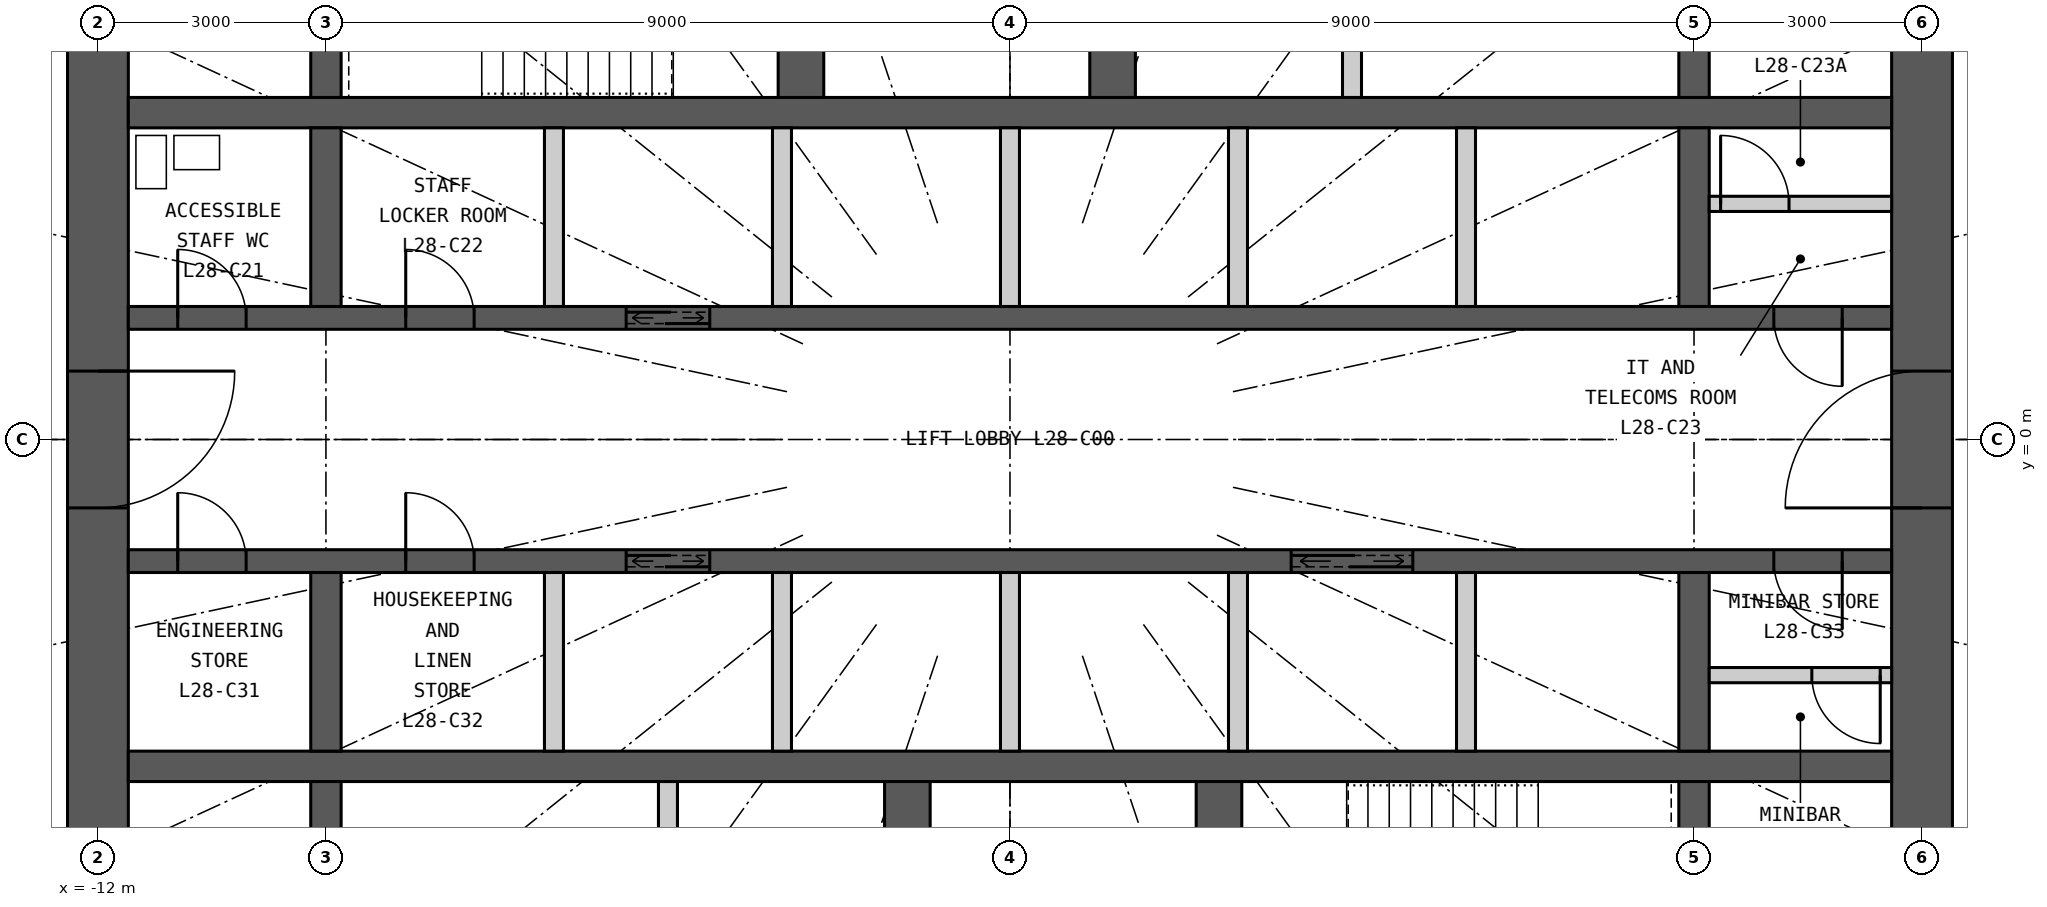
"""IFC4 building model, lengths in metres.
Left out: names, types, materials, properties, quantities, classifications, styles, units other than length and angle.
Written with IfcOpenShell. Run it as: python <this file> out.ifc"""

import sys

from ifc_helpers import new_model, si_unit, direction, frame, frame_2d, origin, place, context, subcontext, project, spatial, rectangle, extrude, element, fill, save


model = new_model("IFC4")
c1 = context("Model", 3, precision=1e-05, world=origin(), true_north=direction((0.0, 1.0)))
c2 = subcontext(c1, "Body", "Model", "MODEL_VIEW")
j1 = project(units=[si_unit("LENGTHUNIT", "METRE"), si_unit("PLANEANGLEUNIT", "RADIAN")], contexts=[c1])
p1 = place(None, origin())
s1 = spatial("IfcSite", under=j1, at=p1, CompositionType="ELEMENT")
p2 = place(p1, origin())
s2 = spatial("IfcBuilding", under=s1, at=p2, CompositionType="ELEMENT")
p3 = place(p2, frame((0.0, 0.0, 112.2)))
s3 = spatial("IfcBuildingStorey", under=s2, at=p3, CompositionType="ELEMENT", Elevation=112.2)
p4 = place(p3, frame((12.0, -7.6, 0.0), z_axis=(0.0, 0.0, 1.0), x_axis=(0.0, 1.0, 0.0)))
e1 = element("IfcWall", 1, at=p4, inside=s3, PredefinedType="SHEAR", context=c2, shape_type="SweptSolid", body=[
    extrude(rectangle(XDim=15.2, YDim=0.8, at=frame_2d((7.6, 0.0))), origin(), (0.0, 0.0, 1.0), 3.3),
])
p5 = place(p4, frame((6.7, 0.0, 0.0)))
e2 = element("IfcOpeningElement", 2, at=p5, cuts=e1, PredefinedType="OPENING", context=c2, shape_type="SweptSolid", body=[
    extrude(rectangle(XDim=1.8, YDim=2.2, at=frame_2d((0.9, 1.1))), frame((0.0, 0.41, 0.0), z_axis=(0.0, -1.0, 0.0), x_axis=(1.0, 0.0, 0.0)), (0.0, 0.0, 1.0), 0.82),
])
p6 = place(p3, frame((-12.0, 7.6, 0.0), z_axis=(0.0, 0.0, 1.0), x_axis=(0.0, -1.0, 0.0)))
e3 = element("IfcWall", 3, at=p6, inside=s3, PredefinedType="SHEAR", context=c2, shape_type="SweptSolid", body=[
    extrude(rectangle(XDim=15.2, YDim=0.8, at=frame_2d((7.6, 0.0))), origin(), (0.0, 0.0, 1.0), 3.3),
])
p7 = place(p6, frame((6.7, 0.0, 0.0)))
e4 = element("IfcOpeningElement", 4, at=p7, cuts=e3, PredefinedType="OPENING", context=c2, shape_type="SweptSolid", body=[
    extrude(rectangle(XDim=1.8, YDim=2.2, at=frame_2d((0.9, 1.1))), frame((0.0, 0.41, 0.0), z_axis=(0.0, -1.0, 0.0), x_axis=(1.0, 0.0, 0.0)), (0.0, 0.0, 1.0), 0.82),
])
p8 = place(p3, frame((-11.6, 4.3, 0.0), z_axis=(0.0, 0.0, 1.0), x_axis=(1.0, 0.0, 0.0)))
e5 = element("IfcWall", 5, at=p8, inside=s3, PredefinedType="SHEAR", context=c2, shape_type="SweptSolid", body=[
    extrude(rectangle(XDim=23.2, YDim=0.4, at=frame_2d((11.6, 0.0))), origin(), (0.0, 0.0, 1.0), 3.3),
])
p9 = place(p3, frame((-11.6, 1.6, 0.0), z_axis=(0.0, 0.0, 1.0), x_axis=(1.0, 0.0, 0.0)))
e6 = element("IfcWall", 6, at=p9, inside=s3, PredefinedType="SHEAR", context=c2, shape_type="SweptSolid", body=[
    extrude(rectangle(XDim=23.2, YDim=0.3, at=frame_2d((11.6, 0.0))), origin(), (0.0, 0.0, 1.0), 3.3),
])
p10 = place(p9, frame((6.55, 0.0, 0.0)))
e7 = element("IfcOpeningElement", 7, at=p10, cuts=e6, PredefinedType="OPENING", context=c2, shape_type="SweptSolid", body=[
    extrude(rectangle(XDim=1.1, YDim=2.2, at=frame_2d((0.55, 1.1))), frame((0.0, 0.16, 0.0), z_axis=(0.0, -1.0, 0.0), x_axis=(1.0, 0.0, 0.0)), (0.0, 0.0, 1.0), 0.32),
])
p11 = place(p9, frame((0.65, 0.0, 0.0)))
e8 = element("IfcOpeningElement", 8, at=p11, cuts=e6, PredefinedType="OPENING", context=c2, shape_type="SweptSolid", body=[
    extrude(rectangle(XDim=0.9, YDim=2.2, at=frame_2d((0.45, 1.1))), frame((0.0, 0.16, 0.0), z_axis=(0.0, -1.0, 0.0), x_axis=(1.0, 0.0, 0.0)), (0.0, 0.0, 1.0), 0.32),
])
p12 = place(p9, frame((3.65, 0.0, 0.0)))
e9 = element("IfcOpeningElement", 9, at=p12, cuts=e6, PredefinedType="OPENING", context=c2, shape_type="SweptSolid", body=[
    extrude(rectangle(XDim=0.9, YDim=2.2, at=frame_2d((0.45, 1.1))), frame((0.0, 0.16, 0.0), z_axis=(0.0, -1.0, 0.0), x_axis=(1.0, 0.0, 0.0)), (0.0, 0.0, 1.0), 0.32),
])
p13 = place(p9, frame((21.65, 0.0, 0.0)))
e10 = element("IfcOpeningElement", 10, at=p13, cuts=e6, PredefinedType="OPENING", context=c2, shape_type="SweptSolid", body=[
    extrude(rectangle(XDim=0.9, YDim=2.2, at=frame_2d((0.45, 1.1))), frame((0.0, 0.16, 0.0), z_axis=(0.0, -1.0, 0.0), x_axis=(1.0, 0.0, 0.0)), (0.0, 0.0, 1.0), 0.32),
])
p14 = place(p3, frame((-11.6, -4.3, 0.0), z_axis=(0.0, 0.0, 1.0), x_axis=(1.0, 0.0, 0.0)))
e11 = element("IfcWall", 11, at=p14, inside=s3, PredefinedType="SHEAR", context=c2, shape_type="SweptSolid", body=[
    extrude(rectangle(XDim=23.2, YDim=0.4, at=frame_2d((11.6, 0.0))), origin(), (0.0, 0.0, 1.0), 3.3),
])
p15 = place(p3, frame((-11.6, -1.6, 0.0), z_axis=(0.0, 0.0, 1.0), x_axis=(1.0, 0.0, 0.0)))
e12 = element("IfcWall", 12, at=p15, inside=s3, PredefinedType="SHEAR", context=c2, shape_type="SweptSolid", body=[
    extrude(rectangle(XDim=23.2, YDim=0.3, at=frame_2d((11.6, 0.0))), origin(), (0.0, 0.0, 1.0), 3.3),
])
p16 = place(p15, frame((6.55, 0.0, 0.0)))
e13 = element("IfcOpeningElement", 13, at=p16, cuts=e12, PredefinedType="OPENING", context=c2, shape_type="SweptSolid", body=[
    extrude(rectangle(XDim=1.1, YDim=2.2, at=frame_2d((0.55, 1.1))), frame((0.0, 0.16, 0.0), z_axis=(0.0, -1.0, 0.0), x_axis=(1.0, 0.0, 0.0)), (0.0, 0.0, 1.0), 0.32),
])
p17 = place(p15, frame((15.3, 0.0, 0.0)))
e14 = element("IfcOpeningElement", 14, at=p17, cuts=e12, PredefinedType="OPENING", context=c2, shape_type="SweptSolid", body=[
    extrude(rectangle(XDim=1.6, YDim=2.4, at=frame_2d((0.8, 1.2))), frame((0.0, 0.16, 0.0), z_axis=(0.0, -1.0, 0.0), x_axis=(1.0, 0.0, 0.0)), (0.0, 0.0, 1.0), 0.32),
])
p18 = place(p15, frame((0.65, 0.0, 0.0)))
e15 = element("IfcOpeningElement", 15, at=p18, cuts=e12, PredefinedType="OPENING", context=c2, shape_type="SweptSolid", body=[
    extrude(rectangle(XDim=0.9, YDim=2.2, at=frame_2d((0.45, 1.1))), frame((0.0, 0.16, 0.0), z_axis=(0.0, -1.0, 0.0), x_axis=(1.0, 0.0, 0.0)), (0.0, 0.0, 1.0), 0.32),
])
p19 = place(p15, frame((3.65, 0.0, 0.0)))
e16 = element("IfcOpeningElement", 16, at=p19, cuts=e12, PredefinedType="OPENING", context=c2, shape_type="SweptSolid", body=[
    extrude(rectangle(XDim=0.9, YDim=2.2, at=frame_2d((0.45, 1.1))), frame((0.0, 0.16, 0.0), z_axis=(0.0, -1.0, 0.0), x_axis=(1.0, 0.0, 0.0)), (0.0, 0.0, 1.0), 0.32),
])
p20 = place(p15, frame((21.65, 0.0, 0.0)))
e17 = element("IfcOpeningElement", 17, at=p20, cuts=e12, PredefinedType="OPENING", context=c2, shape_type="SweptSolid", body=[
    extrude(rectangle(XDim=0.9, YDim=2.2, at=frame_2d((0.45, 1.1))), frame((0.0, 0.16, 0.0), z_axis=(0.0, -1.0, 0.0), x_axis=(1.0, 0.0, 0.0)), (0.0, 0.0, 1.0), 0.32),
])
p21 = place(p3, frame((-9.0, 4.5, 0.0), z_axis=(0.0, 0.0, 1.0), x_axis=(0.0, 1.0, 0.0)))
e18 = element("IfcWall", 18, at=p21, inside=s3, PredefinedType="SHEAR", context=c2, shape_type="SweptSolid", body=[
    extrude(rectangle(XDim=3.1, YDim=0.4, at=frame_2d((1.55, 0.0))), origin(), (0.0, 0.0, 1.0), 3.3),
])
for number, where, z_axis, x_axis in (
    (19, (-9.0, 1.75, 0.0), (0.0, 0.0, 1.0), (0.0, 1.0, 0.0)),
    (20, (-9.0, -4.1, 0.0), (0.0, 0.0, 1.0), (0.0, 1.0, 0.0)),
):
    element("IfcWall", number, at=place(p3, frame(where, z_axis=z_axis, x_axis=x_axis)), inside=s3, PredefinedType="SHEAR", context=c2, shape_type="SweptSolid", body=[
        extrude(rectangle(XDim=2.35, YDim=0.4, at=frame_2d((1.175, 0.0))), origin(), (0.0, 0.0, 1.0), 3.3),
    ])
for number, where, z_axis, x_axis in (
    (21, (-9.0, -7.6, 0.0), (0.0, 0.0, 1.0), (0.0, 1.0, 0.0)),
    (22, (9.0, 4.5, 0.0), (0.0, 0.0, 1.0), (0.0, 1.0, 0.0)),
):
    element("IfcWall", number, at=place(p3, frame(where, z_axis=z_axis, x_axis=x_axis)), inside=s3, PredefinedType="SHEAR", context=c2, shape_type="SweptSolid", body=[
        extrude(rectangle(XDim=3.1, YDim=0.4, at=frame_2d((1.55, 0.0))), origin(), (0.0, 0.0, 1.0), 3.3),
    ])
for number, where, z_axis, x_axis in (
    (23, (9.0, 1.75, 0.0), (0.0, 0.0, 1.0), (0.0, 1.0, 0.0)),
    (24, (9.0, -4.1, 0.0), (0.0, 0.0, 1.0), (0.0, 1.0, 0.0)),
):
    element("IfcWall", number, at=place(p3, frame(where, z_axis=z_axis, x_axis=x_axis)), inside=s3, PredefinedType="SHEAR", context=c2, shape_type="SweptSolid", body=[
        extrude(rectangle(XDim=2.35, YDim=0.4, at=frame_2d((1.175, 0.0))), origin(), (0.0, 0.0, 1.0), 3.3),
    ])
p22 = place(p3, frame((9.0, -7.6, 0.0), z_axis=(0.0, 0.0, 1.0), x_axis=(0.0, 1.0, 0.0)))
e25 = element("IfcWall", 25, at=p22, inside=s3, PredefinedType="SHEAR", context=c2, shape_type="SweptSolid", body=[
    extrude(rectangle(XDim=3.1, YDim=0.4, at=frame_2d((1.55, 0.0))), origin(), (0.0, 0.0, 1.0), 3.3),
])
p23 = place(p3, frame((-2.75, 4.5, 0.0), z_axis=(0.0, 0.0, 1.0), x_axis=(0.0, 1.0, 0.0)))
e26 = element("IfcWall", 26, at=p23, inside=s3, PredefinedType="SHEAR", context=c2, shape_type="SweptSolid", body=[
    extrude(rectangle(XDim=3.1, YDim=0.6, at=frame_2d((1.55, 0.0))), origin(), (0.0, 0.0, 1.0), 3.3),
])
p24 = place(p23, frame((0.925, 0.0, 0.0)))
e27 = element("IfcOpeningElement", 27, at=p24, cuts=e26, PredefinedType="OPENING", context=c2, shape_type="SweptSolid", body=[
    extrude(rectangle(XDim=1.1, YDim=2.2, at=frame_2d((0.55, 1.1))), frame((0.0, 0.31, 0.0), z_axis=(0.0, -1.0, 0.0), x_axis=(1.0, 0.0, 0.0)), (0.0, 0.0, 1.0), 0.62),
])
p25 = place(p3, frame((1.35, 4.5, 0.0), z_axis=(0.0, 0.0, 1.0), x_axis=(0.0, 1.0, 0.0)))
e28 = element("IfcWall", 28, at=p25, inside=s3, PredefinedType="SHEAR", context=c2, shape_type="SweptSolid", body=[
    extrude(rectangle(XDim=3.1, YDim=0.6, at=frame_2d((1.55, 0.0))), origin(), (0.0, 0.0, 1.0), 3.3),
])
p26 = place(p25, frame((1.0, 0.0, 0.0)))
e29 = element("IfcOpeningElement", 29, at=p26, cuts=e28, PredefinedType="OPENING", context=c2, shape_type="SweptSolid", body=[
    extrude(rectangle(XDim=1.1, YDim=2.2, at=frame_2d((0.55, 1.1))), frame((0.0, 0.31, 0.0), z_axis=(0.0, -1.0, 0.0), x_axis=(1.0, 0.0, 0.0)), (0.0, 0.0, 1.0), 0.62),
])
p27 = place(p3, frame((4.5, 4.5, 0.0), z_axis=(0.0, 0.0, 1.0), x_axis=(0.0, 1.0, 0.0)))
e30 = element("IfcWall", 30, at=p27, inside=s3, PredefinedType="PARTITIONING", context=c2, shape_type="SweptSolid", body=[
    extrude(rectangle(XDim=3.1, YDim=0.25, at=frame_2d((1.55, 0.0))), origin(), (0.0, 0.0, 1.0), 3.3),
])
p28 = place(p3, frame((2.75, -7.6, 0.0), z_axis=(0.0, 0.0, 1.0), x_axis=(0.0, 1.0, 0.0)))
e31 = element("IfcWall", 31, at=p28, inside=s3, PredefinedType="SHEAR", context=c2, shape_type="SweptSolid", body=[
    extrude(rectangle(XDim=3.1, YDim=0.6, at=frame_2d((1.55, 0.0))), origin(), (0.0, 0.0, 1.0), 3.3),
])
p29 = place(p28, frame((1.075, 0.0, 0.0)))
e32 = element("IfcOpeningElement", 32, at=p29, cuts=e31, PredefinedType="OPENING", context=c2, shape_type="SweptSolid", body=[
    extrude(rectangle(XDim=1.1, YDim=2.2, at=frame_2d((0.55, 1.1))), frame((0.0, 0.31, 0.0), z_axis=(0.0, -1.0, 0.0), x_axis=(1.0, 0.0, 0.0)), (0.0, 0.0, 1.0), 0.62),
])
p30 = place(p3, frame((-1.35, -7.6, 0.0), z_axis=(0.0, 0.0, 1.0), x_axis=(0.0, 1.0, 0.0)))
e33 = element("IfcWall", 33, at=p30, inside=s3, PredefinedType="SHEAR", context=c2, shape_type="SweptSolid", body=[
    extrude(rectangle(XDim=3.1, YDim=0.6, at=frame_2d((1.55, 0.0))), origin(), (0.0, 0.0, 1.0), 3.3),
])
p31 = place(p30, frame((1.0, 0.0, 0.0)))
e34 = element("IfcOpeningElement", 34, at=p31, cuts=e33, PredefinedType="OPENING", context=c2, shape_type="SweptSolid", body=[
    extrude(rectangle(XDim=1.1, YDim=2.2, at=frame_2d((0.55, 1.1))), frame((0.0, 0.31, 0.0), z_axis=(0.0, -1.0, 0.0), x_axis=(1.0, 0.0, 0.0)), (0.0, 0.0, 1.0), 0.62),
])
p32 = place(p3, frame((-4.5, -7.6, 0.0), z_axis=(0.0, 0.0, 1.0), x_axis=(0.0, 1.0, 0.0)))
e35 = element("IfcWall", 35, at=p32, inside=s3, PredefinedType="PARTITIONING", context=c2, shape_type="SweptSolid", body=[
    extrude(rectangle(XDim=3.1, YDim=0.25, at=frame_2d((1.55, 0.0))), origin(), (0.0, 0.0, 1.0), 3.3),
])
for number, where, z_axis, x_axis in (
    (36, (-6.0, 1.75, 0.0), (0.0, 0.0, 1.0), (0.0, 1.0, 0.0)),
    (37, (-3.0, 1.75, 0.0), (0.0, 0.0, 1.0), (0.0, 1.0, 0.0)),
    (38, (0.0, 1.75, 0.0), (0.0, 0.0, 1.0), (0.0, 1.0, 0.0)),
    (39, (3.0, 1.75, 0.0), (0.0, 0.0, 1.0), (0.0, 1.0, 0.0)),
    (40, (6.0, 1.75, 0.0), (0.0, 0.0, 1.0), (0.0, 1.0, 0.0)),
    (41, (-6.0, -4.1, 0.0), (0.0, 0.0, 1.0), (0.0, 1.0, 0.0)),
    (42, (-3.0, -4.1, 0.0), (0.0, 0.0, 1.0), (0.0, 1.0, 0.0)),
    (43, (0.0, -4.1, 0.0), (0.0, 0.0, 1.0), (0.0, 1.0, 0.0)),
    (44, (3.0, -4.1, 0.0), (0.0, 0.0, 1.0), (0.0, 1.0, 0.0)),
    (45, (6.0, -4.1, 0.0), (0.0, 0.0, 1.0), (0.0, 1.0, 0.0)),
):
    element("IfcWall", number, at=place(p3, frame(where, z_axis=z_axis, x_axis=x_axis)), inside=s3, PredefinedType="PARTITIONING", context=c2, shape_type="SweptSolid", body=[
        extrude(rectangle(XDim=2.35, YDim=0.25, at=frame_2d((1.175, 0.0))), origin(), (0.0, 0.0, 1.0), 3.3),
    ])
p33 = place(p3, frame((9.2, 3.1, 0.0), z_axis=(0.0, 0.0, 1.0), x_axis=(1.0, 0.0, 0.0)))
e46 = element("IfcWall", 46, at=p33, inside=s3, PredefinedType="PARTITIONING", context=c2, shape_type="SweptSolid", body=[
    extrude(rectangle(XDim=2.4, YDim=0.2, at=frame_2d((1.2, 0.0))), origin(), (0.0, 0.0, 1.0), 3.12),
])
p34 = place(p33, frame((0.15, 0.0, 0.0)))
e47 = element("IfcOpeningElement", 47, at=p34, cuts=e46, PredefinedType="OPENING", context=c2, shape_type="SweptSolid", body=[
    extrude(rectangle(XDim=0.9, YDim=2.2, at=frame_2d((0.45, 1.1))), frame((0.0, 0.11, 0.0), z_axis=(0.0, -1.0, 0.0), x_axis=(1.0, 0.0, 0.0)), (0.0, 0.0, 1.0), 0.22),
])
p35 = place(p3, frame((9.2, -3.1, 0.0), z_axis=(0.0, 0.0, 1.0), x_axis=(1.0, 0.0, 0.0)))
e48 = element("IfcWall", 48, at=p35, inside=s3, PredefinedType="PARTITIONING", context=c2, shape_type="SweptSolid", body=[
    extrude(rectangle(XDim=2.4, YDim=0.2, at=frame_2d((1.2, 0.0))), origin(), (0.0, 0.0, 1.0), 3.12),
])
p36 = place(p35, frame((1.35, 0.0, 0.0)))
e49 = element("IfcOpeningElement", 49, at=p36, cuts=e48, PredefinedType="OPENING", context=c2, shape_type="SweptSolid", body=[
    extrude(rectangle(XDim=0.9, YDim=2.2, at=frame_2d((0.45, 1.1))), frame((0.0, 0.11, 0.0), z_axis=(0.0, -1.0, 0.0), x_axis=(1.0, 0.0, 0.0)), (0.0, 0.0, 1.0), 0.22),
])
p37 = place(p10, origin())
e50 = element("IfcDoor", 50, at=p37, inside=s3, OperationType="DOUBLE_DOOR_SLIDING", PredefinedType="DOOR", context=c2, shape_type="SweptSolid", body=[
    extrude(rectangle(XDim=1.1, YDim=2.2, at=frame_2d((0.55, 1.1))), frame((0.0, 0.025, 0.0), z_axis=(0.0, -1.0, 0.0), x_axis=(1.0, 0.0, 0.0)), (0.0, 0.0, 1.0), 0.05),
])
fill(e7, e50)
p38 = place(p16, origin())
e51 = element("IfcDoor", 51, at=p38, inside=s3, OperationType="DOUBLE_DOOR_SLIDING", PredefinedType="DOOR", context=c2, shape_type="SweptSolid", body=[
    extrude(rectangle(XDim=1.1, YDim=2.2, at=frame_2d((0.55, 1.1))), frame((0.0, 0.025, 0.0), z_axis=(0.0, -1.0, 0.0), x_axis=(1.0, 0.0, 0.0)), (0.0, 0.0, 1.0), 0.05),
])
fill(e13, e51)
p39 = place(p17, origin())
e52 = element("IfcDoor", 52, at=p39, inside=s3, OperationType="DOUBLE_DOOR_SLIDING", PredefinedType="DOOR", context=c2, shape_type="SweptSolid", body=[
    extrude(rectangle(XDim=1.6, YDim=2.4, at=frame_2d((0.8, 1.2))), frame((0.0, 0.025, 0.0), z_axis=(0.0, -1.0, 0.0), x_axis=(1.0, 0.0, 0.0)), (0.0, 0.0, 1.0), 0.05),
])
fill(e14, e52)
p40 = place(p11, origin())
e53 = element("IfcDoor", 53, at=p40, inside=s3, OperationType="SINGLE_SWING_LEFT", PredefinedType="DOOR", context=c2, shape_type="SweptSolid", body=[
    extrude(rectangle(XDim=0.9, YDim=2.2, at=frame_2d((0.45, 1.1))), frame((0.0, 0.025, 0.0), z_axis=(0.0, -1.0, 0.0), x_axis=(1.0, 0.0, 0.0)), (0.0, 0.0, 1.0), 0.05),
])
fill(e8, e53)
p41 = place(p12, origin())
e54 = element("IfcDoor", 54, at=p41, inside=s3, OperationType="SINGLE_SWING_LEFT", PredefinedType="DOOR", context=c2, shape_type="SweptSolid", body=[
    extrude(rectangle(XDim=0.9, YDim=2.2, at=frame_2d((0.45, 1.1))), frame((0.0, 0.025, 0.0), z_axis=(0.0, -1.0, 0.0), x_axis=(1.0, 0.0, 0.0)), (0.0, 0.0, 1.0), 0.05),
])
fill(e9, e54)
p42 = place(p34, origin())
e55 = element("IfcDoor", 55, at=p42, inside=s3, OperationType="SINGLE_SWING_LEFT", PredefinedType="DOOR", context=c2, shape_type="SweptSolid", body=[
    extrude(rectangle(XDim=0.9, YDim=2.2, at=frame_2d((0.45, 1.1))), frame((0.0, 0.025, 0.0), z_axis=(0.0, -1.0, 0.0), x_axis=(1.0, 0.0, 0.0)), (0.0, 0.0, 1.0), 0.05),
])
fill(e47, e55)
p43 = place(p13, origin())
e56 = element("IfcDoor", 56, at=p43, inside=s3, OperationType="SINGLE_SWING_RIGHT", PredefinedType="DOOR", context=c2, shape_type="SweptSolid", body=[
    extrude(rectangle(XDim=0.9, YDim=2.2, at=frame_2d((0.45, 1.1))), frame((0.0, 0.025, 0.0), z_axis=(0.0, -1.0, 0.0), x_axis=(1.0, 0.0, 0.0)), (0.0, 0.0, 1.0), 0.05),
])
fill(e10, e56)
p44 = place(p18, origin())
e57 = element("IfcDoor", 57, at=p44, inside=s3, OperationType="SINGLE_SWING_LEFT", PredefinedType="DOOR", context=c2, shape_type="SweptSolid", body=[
    extrude(rectangle(XDim=0.9, YDim=2.2, at=frame_2d((0.45, 1.1))), frame((0.0, 0.025, 0.0), z_axis=(0.0, -1.0, 0.0), x_axis=(1.0, 0.0, 0.0)), (0.0, 0.0, 1.0), 0.05),
])
fill(e15, e57)
p45 = place(p19, origin())
e58 = element("IfcDoor", 58, at=p45, inside=s3, OperationType="SINGLE_SWING_LEFT", PredefinedType="DOOR", context=c2, shape_type="SweptSolid", body=[
    extrude(rectangle(XDim=0.9, YDim=2.2, at=frame_2d((0.45, 1.1))), frame((0.0, 0.025, 0.0), z_axis=(0.0, -1.0, 0.0), x_axis=(1.0, 0.0, 0.0)), (0.0, 0.0, 1.0), 0.05),
])
fill(e16, e58)
p46 = place(p36, origin())
e59 = element("IfcDoor", 59, at=p46, inside=s3, OperationType="SINGLE_SWING_RIGHT", PredefinedType="DOOR", context=c2, shape_type="SweptSolid", body=[
    extrude(rectangle(XDim=0.9, YDim=2.2, at=frame_2d((0.45, 1.1))), frame((0.0, 0.025, 0.0), z_axis=(0.0, -1.0, 0.0), x_axis=(1.0, 0.0, 0.0)), (0.0, 0.0, 1.0), 0.05),
])
fill(e49, e59)
p47 = place(p20, origin())
e60 = element("IfcDoor", 60, at=p47, inside=s3, OperationType="SINGLE_SWING_RIGHT", PredefinedType="DOOR", context=c2, shape_type="SweptSolid", body=[
    extrude(rectangle(XDim=0.9, YDim=2.2, at=frame_2d((0.45, 1.1))), frame((0.0, 0.025, 0.0), z_axis=(0.0, -1.0, 0.0), x_axis=(1.0, 0.0, 0.0)), (0.0, 0.0, 1.0), 0.05),
])
fill(e17, e60)
p48 = place(p5, origin())
e61 = element("IfcDoor", 61, at=p48, inside=s3, OperationType="DOUBLE_DOOR_DOUBLE_SWING", PredefinedType="DOOR", context=c2, shape_type="SweptSolid", body=[
    extrude(rectangle(XDim=1.8, YDim=2.2, at=frame_2d((0.9, 1.1))), frame((0.0, 0.025, 0.0), z_axis=(0.0, -1.0, 0.0), x_axis=(1.0, 0.0, 0.0)), (0.0, 0.0, 1.0), 0.05),
])
fill(e2, e61)
p49 = place(p7, origin())
e62 = element("IfcDoor", 62, at=p49, inside=s3, OperationType="DOUBLE_DOOR_DOUBLE_SWING", PredefinedType="DOOR", context=c2, shape_type="SweptSolid", body=[
    extrude(rectangle(XDim=1.8, YDim=2.2, at=frame_2d((0.9, 1.1))), frame((0.0, 0.025, 0.0), z_axis=(0.0, -1.0, 0.0), x_axis=(1.0, 0.0, 0.0)), (0.0, 0.0, 1.0), 0.05),
])
fill(e4, e62)
save(model, sys.argv[1])
